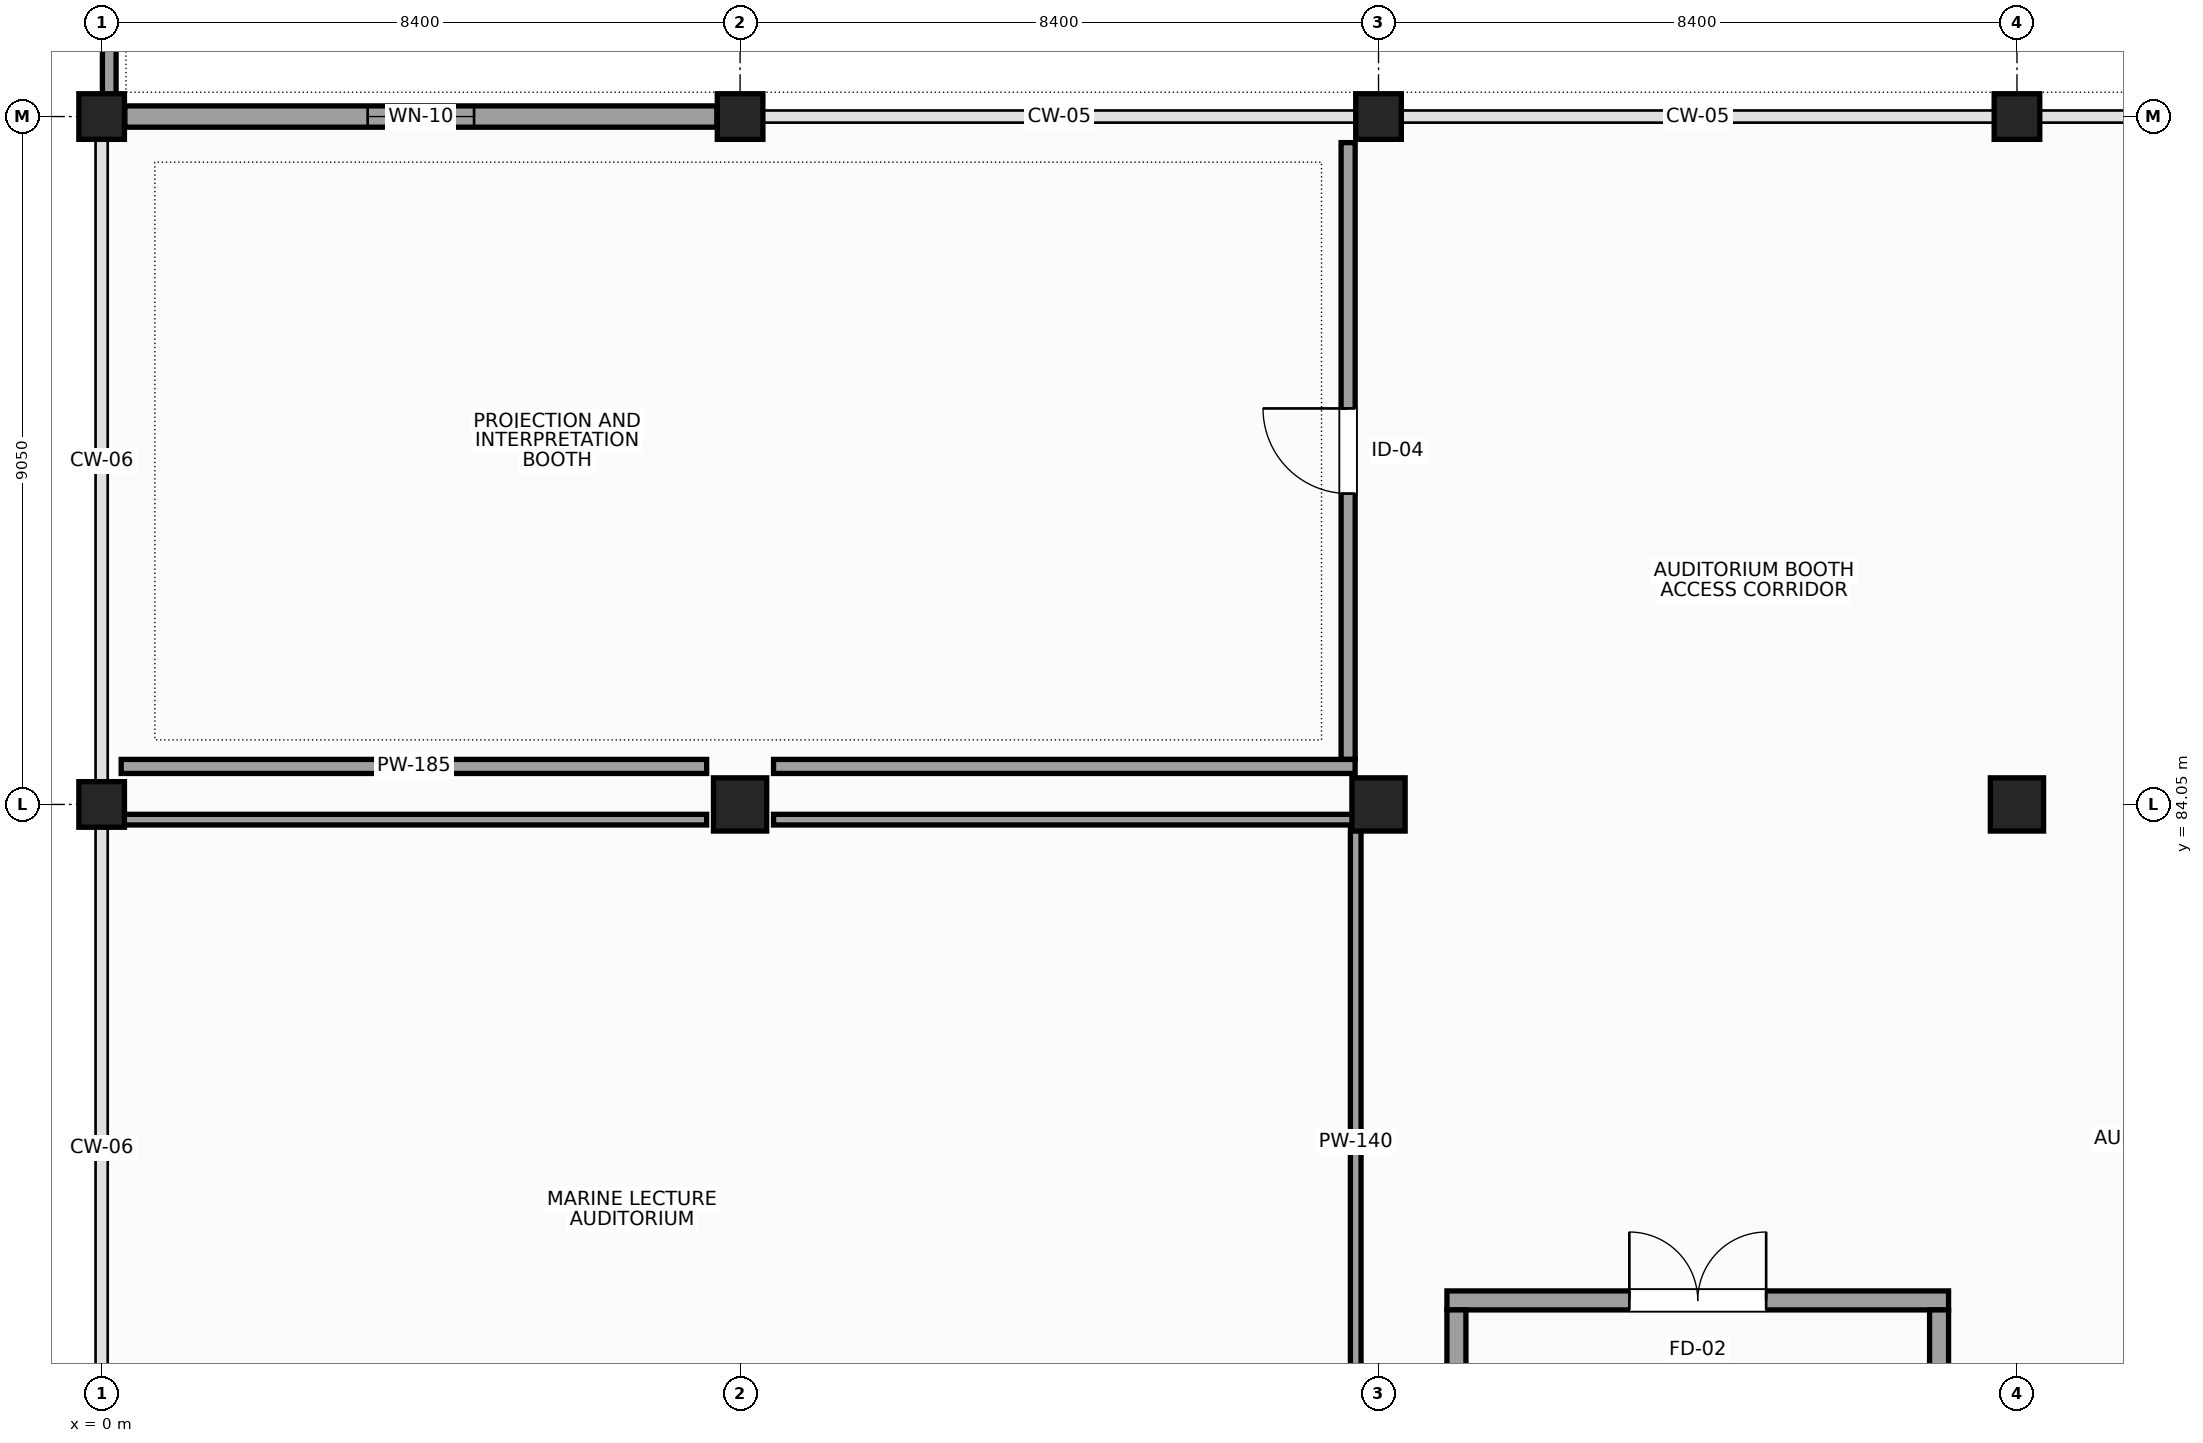
"""IFC4 building model, lengths in metres.
Left out: names, types, materials, properties, quantities, classifications, styles, units other than length and angle.
Written with IfcOpenShell. Run it as: python <this file> out.ifc"""

import sys

from ifc_helpers import new_model, si_unit, direction, frame, frame_2d, origin, origin_2d, place, context, subcontext, project, spatial, rectangle, extrude, element, fill, save


model = new_model("IFC4")
c1 = context("Model", 3, precision=1e-05, world=origin(), true_north=direction((0.0, 1.0)))
c2 = subcontext(c1, "Body", "Model", "MODEL_VIEW")
j1 = project(units=[si_unit("LENGTHUNIT", "METRE"), si_unit("PLANEANGLEUNIT", "RADIAN")], contexts=[c1])
p1 = place(None, origin())
s1 = spatial("IfcSite", under=j1, at=p1, CompositionType="ELEMENT")
p2 = place(p1, origin())
s2 = spatial("IfcBuilding", under=s1, at=p2, CompositionType="ELEMENT")
p3 = place(p2, frame((0.0, 0.0, 5.4)))
s3 = spatial("IfcBuildingStorey", under=s2, at=p3, CompositionType="ELEMENT", Elevation=5.4)
for number, where, z_axis, x_axis in (
    (1, (0.0, 84.05, 0.0), (0.0, 0.0, 1.0), (1.0, 0.0, 0.0)),
    (2, (0.0, 93.1, 0.0), (0.0, 0.0, 1.0), (1.0, 0.0, 0.0)),
):
    element("IfcColumn", number, at=place(p3, frame(where, z_axis=z_axis, x_axis=x_axis)), inside=s3, PredefinedType="COLUMN", context=c2, shape_type="SweptSolid", body=[
        extrude(rectangle(XDim=0.6, YDim=0.6, at=origin_2d()), origin(), (0.0, 0.0, 1.0), 5.4),
    ])
p4 = place(p3, frame((8.4, 84.05, 0.0), z_axis=(0.0, 0.0, 1.0), x_axis=(1.0, 0.0, 0.0)))
e3 = element("IfcColumn", 3, at=p4, inside=s3, PredefinedType="COLUMN", context=c2, shape_type="SweptSolid", body=[
    extrude(rectangle(XDim=0.7, YDim=0.7, at=origin_2d()), origin(), (0.0, 0.0, 1.0), 5.4),
])
p5 = place(p3, frame((8.4, 93.1, 0.0), z_axis=(0.0, 0.0, 1.0), x_axis=(1.0, 0.0, 0.0)))
e4 = element("IfcColumn", 4, at=p5, inside=s3, PredefinedType="COLUMN", context=c2, shape_type="SweptSolid", body=[
    extrude(rectangle(XDim=0.6, YDim=0.6, at=origin_2d()), origin(), (0.0, 0.0, 1.0), 5.4),
])
p6 = place(p3, frame((16.8, 84.05, 0.0), z_axis=(0.0, 0.0, 1.0), x_axis=(1.0, 0.0, 0.0)))
e5 = element("IfcColumn", 5, at=p6, inside=s3, PredefinedType="COLUMN", context=c2, shape_type="SweptSolid", body=[
    extrude(rectangle(XDim=0.7, YDim=0.7, at=origin_2d()), origin(), (0.0, 0.0, 1.0), 5.4),
])
p7 = place(p3, frame((16.8, 93.1, 0.0), z_axis=(0.0, 0.0, 1.0), x_axis=(1.0, 0.0, 0.0)))
e6 = element("IfcColumn", 6, at=p7, inside=s3, PredefinedType="COLUMN", context=c2, shape_type="SweptSolid", body=[
    extrude(rectangle(XDim=0.6, YDim=0.6, at=origin_2d()), origin(), (0.0, 0.0, 1.0), 5.4),
])
p8 = place(p3, frame((25.2, 84.05, 0.0), z_axis=(0.0, 0.0, 1.0), x_axis=(1.0, 0.0, 0.0)))
e7 = element("IfcColumn", 7, at=p8, inside=s3, PredefinedType="COLUMN", context=c2, shape_type="SweptSolid", body=[
    extrude(rectangle(XDim=0.7, YDim=0.7, at=origin_2d()), origin(), (0.0, 0.0, 1.0), 5.4),
])
p9 = place(p3, frame((25.2, 93.1, 0.0), z_axis=(0.0, 0.0, 1.0), x_axis=(1.0, 0.0, 0.0)))
e8 = element("IfcColumn", 8, at=p9, inside=s3, PredefinedType="COLUMN", context=c2, shape_type="SweptSolid", body=[
    extrude(rectangle(XDim=0.6, YDim=0.6, at=origin_2d()), origin(), (0.0, 0.0, 1.0), 5.4),
])
p10 = place(p3, frame((8.095, 93.1, 0.0), z_axis=(0.0, 0.0, 1.0), x_axis=(-1.0, 0.0, 0.0)))
e9 = element("IfcWall", 9, at=p10, inside=s3, PredefinedType="STANDARD", context=c2, shape_type="SweptSolid", body=[
    extrude(rectangle(XDim=7.79, YDim=0.28, at=frame_2d((3.895, 0.0))), origin(), (0.0, 0.0, 1.0), 4.23),
])
p11 = place(p10, frame((3.195, 0.0, 0.95)))
e10 = element("IfcOpeningElement", 10, at=p11, cuts=e9, PredefinedType="OPENING", context=c2, shape_type="SweptSolid", body=[
    extrude(rectangle(XDim=1.4, YDim=1.6, at=frame_2d((0.7, 0.8))), frame((0.0, 0.15, 0.0), z_axis=(0.0, -1.0, 0.0), x_axis=(1.0, 0.0, 0.0)), (0.0, 0.0, 1.0), 0.3),
])
p12 = place(p3, frame((0.1, 93.3, 0.0), z_axis=(0.0, 0.0, 1.0), x_axis=(0.0, 1.0, 0.0)))
e11 = element("IfcWall", 11, at=p12, inside=s3, PredefinedType="PARAPET", context=c2, shape_type="SweptSolid", body=[
    extrude(rectangle(XDim=8.65, YDim=0.18, at=frame_2d((4.325, 0.0))), origin(), (0.0, 0.0, 1.0), 1.12),
])
p13 = place(p3, frame((17.7, 77.525, 0.0), z_axis=(0.0, 0.0, 1.0), x_axis=(1.0, 0.0, 0.0)))
e12 = element("IfcWall", 12, at=p13, inside=s3, PredefinedType="PARTITIONING", context=c2, shape_type="SweptSolid", body=[
    extrude(rectangle(XDim=6.6, YDim=0.25, at=frame_2d((3.3, 0.0))), origin(), (0.0, 0.0, 1.0), 5.1),
])
p14 = place(p13, frame((2.4, 0.0, 0.0)))
e13 = element("IfcOpeningElement", 13, at=p14, cuts=e12, PredefinedType="OPENING", context=c2, shape_type="SweptSolid", body=[
    extrude(rectangle(XDim=1.8, YDim=2.25, at=frame_2d((0.9, 1.125))), frame((0.0, 0.135, 0.0), z_axis=(0.0, -1.0, 0.0), x_axis=(1.0, 0.0, 0.0)), (0.0, 0.0, 1.0), 0.27),
])
for number, where, z_axis, x_axis in (
    (14, (17.825, 74.45, 0.0), (0.0, 0.0, 1.0), (0.0, 1.0, 0.0)),
    (15, (24.175, 74.45, 0.0), (0.0, 0.0, 1.0), (0.0, 1.0, 0.0)),
):
    element("IfcWall", number, at=place(p3, frame(where, z_axis=z_axis, x_axis=x_axis)), inside=s3, PredefinedType="PARTITIONING", context=c2, shape_type="SweptSolid", body=[
        extrude(rectangle(XDim=2.95, YDim=0.25, at=frame_2d((1.475, 0.0))), origin(), (0.0, 0.0, 1.0), 4.33),
    ])
p15 = place(p3, frame((16.5, 75.44, 0.0), z_axis=(0.0, 0.0, 1.0), x_axis=(0.0, 1.0, 0.0)))
e16 = element("IfcWall", 16, at=p15, inside=s3, PredefinedType="PARTITIONING", context=c2, shape_type="SweptSolid", body=[
    extrude(rectangle(XDim=8.34, YDim=0.14, at=frame_2d((4.17, 0.0))), origin(), (0.0, 0.0, 1.0), 1.72),
])
p16 = place(p3, frame((0.18, 83.85, 0.0), z_axis=(0.0, 0.0, 1.0), x_axis=(1.0, 0.0, 0.0)))
e17 = element("IfcWall", 17, at=p16, inside=s3, PredefinedType="PARTITIONING", context=c2, shape_type="SweptSolid", body=[
    extrude(rectangle(XDim=7.78, YDim=0.14, at=frame_2d((3.89, 0.0))), origin(), (0.0, 0.0, 1.0), 1.72),
])
p17 = place(p3, frame((8.84, 83.85, 0.0), z_axis=(0.0, 0.0, 1.0), x_axis=(1.0, 0.0, 0.0)))
e18 = element("IfcWall", 18, at=p17, inside=s3, PredefinedType="PARTITIONING", context=c2, shape_type="SweptSolid", body=[
    extrude(rectangle(XDim=7.73, YDim=0.14, at=frame_2d((3.865, 0.0))), origin(), (0.0, 0.0, 1.0), 1.72),
])
p18 = place(p3, frame((16.4, 84.642, 0.0), z_axis=(0.0, 0.0, 1.0), x_axis=(0.0, 1.0, 0.0)))
e19 = element("IfcWall", 19, at=p18, inside=s3, PredefinedType="PARTITIONING", context=c2, shape_type="SweptSolid", body=[
    extrude(rectangle(XDim=8.115, YDim=0.185, at=frame_2d((4.058, 0.0))), origin(), (0.0, 0.0, 1.0), 4.23),
])
p19 = place(p18, frame((3.498, 0.0, 0.0)))
e20 = element("IfcOpeningElement", 20, at=p19, cuts=e19, PredefinedType="OPENING", context=c2, shape_type="SweptSolid", body=[
    extrude(rectangle(XDim=1.12, YDim=2.2, at=frame_2d((0.56, 1.1))), frame((0.0, 0.103, 0.0), z_axis=(0.0, -1.0, 0.0), x_axis=(1.0, 0.0, 0.0)), (0.0, 0.0, 1.0), 0.205),
])
p20 = place(p3, frame((0.257, 84.55, 0.0), z_axis=(0.0, 0.0, 1.0), x_axis=(1.0, 0.0, 0.0)))
e21 = element("IfcWall", 21, at=p20, inside=s3, PredefinedType="PARTITIONING", context=c2, shape_type="SweptSolid", body=[
    extrude(rectangle(XDim=7.703, YDim=0.185, at=frame_2d((3.852, 0.0))), origin(), (0.0, 0.0, 1.0), 4.25),
])
p21 = place(p3, frame((8.84, 84.55, 0.0), z_axis=(0.0, 0.0, 1.0), x_axis=(1.0, 0.0, 0.0)))
e22 = element("IfcWall", 22, at=p21, inside=s3, PredefinedType="PARTITIONING", context=c2, shape_type="SweptSolid", body=[
    extrude(rectangle(XDim=7.652, YDim=0.185, at=frame_2d((3.826, 0.0))), origin(), (0.0, 0.0, 1.0), 4.35),
])
p22 = place(p11, origin())
e23 = element("IfcWindow", 23, at=p22, inside=s3, PartitioningType="SINGLE_PANEL", PredefinedType="WINDOW", context=c2, shape_type="SweptSolid", body=[
    extrude(rectangle(XDim=1.4, YDim=1.6, at=frame_2d((0.7, 0.8))), frame((0.0, 0.03, 0.0), z_axis=(0.0, -1.0, 0.0), x_axis=(1.0, 0.0, 0.0)), (0.0, 0.0, 1.0), 0.06),
])
fill(e10, e23)
p23 = place(p14, origin())
e24 = element("IfcDoor", 24, at=p23, inside=s3, OperationType="DOUBLE_DOOR_SINGLE_SWING", PredefinedType="DOOR", context=c2, shape_type="SweptSolid", body=[
    extrude(rectangle(XDim=1.8, YDim=2.25, at=frame_2d((0.9, 1.125))), frame((0.0, 0.025, 0.0), z_axis=(0.0, -1.0, 0.0), x_axis=(1.0, 0.0, 0.0)), (0.0, 0.0, 1.0), 0.05),
])
fill(e13, e24)
p24 = place(p19, origin())
e25 = element("IfcDoor", 25, at=p24, inside=s3, OperationType="SINGLE_SWING_RIGHT", PredefinedType="DOOR", context=c2, shape_type="SweptSolid", body=[
    extrude(rectangle(XDim=1.12, YDim=2.2, at=frame_2d((0.56, 1.1))), frame((0.0, 0.025, 0.0), z_axis=(0.0, -1.0, 0.0), x_axis=(1.0, 0.0, 0.0)), (0.0, 0.0, 1.0), 0.05),
])
fill(e20, e25)
save(model, sys.argv[1])
